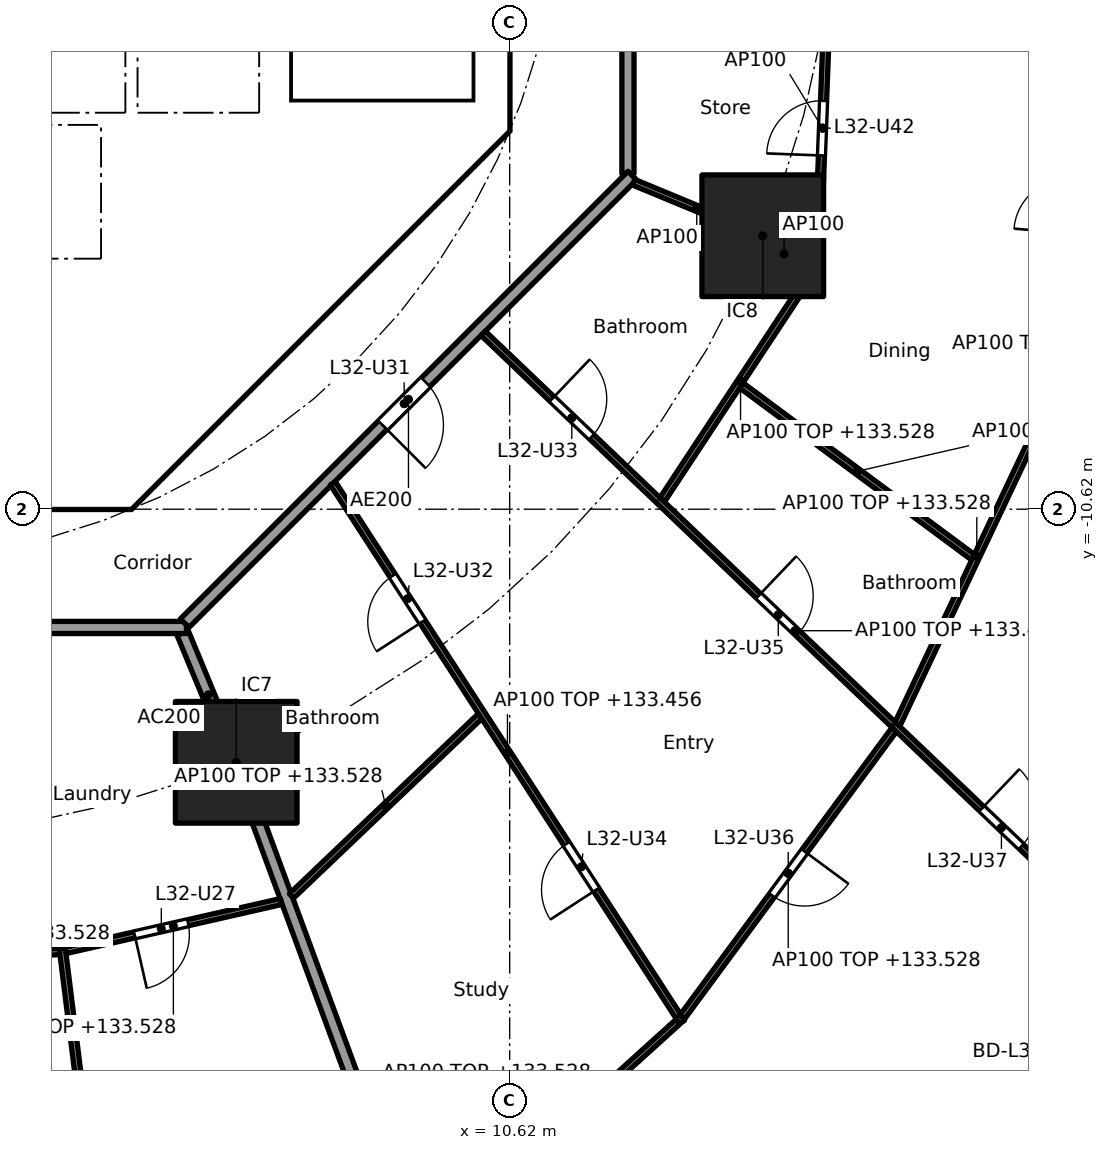
"""IFC4 building model, lengths in metres.
Left out: names, types, materials, properties, quantities, classifications, styles, units other than length and angle.
Written with IfcOpenShell. Run it as: python <this file> out.ifc"""

import sys

from ifc_helpers import new_model, si_unit, direction, frame, frame_2d, origin, origin_2d, place, context, subcontext, project, spatial, polyline, rectangle, outline, extrude, element, fill, save


model = new_model("IFC4")
c1 = context("Model", 3, precision=1e-05, world=origin(), true_north=direction((0.0, 1.0)))
c2 = subcontext(c1, "Body", "Model", "MODEL_VIEW")
j1 = project(units=[si_unit("LENGTHUNIT", "METRE"), si_unit("PLANEANGLEUNIT", "RADIAN")], contexts=[c1])
p1 = place(None, origin())
s1 = spatial("IfcSite", under=j1, at=p1, CompositionType="ELEMENT")
p2 = place(p1, origin())
s2 = spatial("IfcBuilding", under=s1, at=p2, CompositionType="ELEMENT")
p3 = place(p2, frame((0.0, 0.0, 130.7)))
s3 = spatial("IfcBuildingStorey", under=s2, at=p3, CompositionType="ELEMENT", Elevation=130.7)
for number, where, z_axis, x_axis in (
    (1, (6.123, -14.782, 0.0), (0.0, 0.0, 1.0), (1.0, 0.0, 0.0)),
    (2, (14.782, -6.123, 0.0), (0.0, 0.0, 1.0), (1.0, 0.0, 0.0)),
):
    element("IfcColumn", number, at=place(p3, frame(where, z_axis=z_axis, x_axis=x_axis)), inside=s3, PredefinedType="COLUMN", context=c2, shape_type="SweptSolid", body=[
        extrude(rectangle(XDim=2.0, YDim=2.0, at=origin_2d()), origin(), (0.0, 0.0, 1.0), 3.7),
    ])
p4 = place(p3, frame((20.768, -18.669, 0.0), z_axis=(0.0, 0.0, 1.0), x_axis=(-0.506314982873, -0.862348617508, 0.0)))
e3 = element("IfcWall", 3, at=p4, inside=s3, PredefinedType="SOLIDWALL", context=c2, shape_type="SweptSolid", body=[
    extrude(rectangle(XDim=3.208, YDim=0.25, at=frame_2d((1.604, 0.0))), origin(), (0.0, 0.0, 1.0), 3.44),
])
p5 = place(p4, frame((0.554, 0.0, 0.0)))
e4 = element("IfcOpeningElement", 4, at=p5, cuts=e3, PredefinedType="OPENING", context=c2, shape_type="SweptSolid", body=[
    extrude(rectangle(XDim=2.1, YDim=2.4, at=frame_2d((1.05, 1.2))), frame((0.0, 0.135, 0.0), z_axis=(0.0, -1.0, 0.0), x_axis=(1.0, 0.0, 0.0)), (0.0, 0.0, 1.0), 0.27),
])
p6 = place(p3, frame((4.613, -9.988, 0.0), z_axis=(0.0, 0.0, 1.0), x_axis=(0.707106781187, 0.707106781187, 0.0)))
e5 = element("IfcWall", 5, at=p6, inside=s3, PredefinedType="SHEAR", context=c2, shape_type="SweptSolid", body=[
    extrude(rectangle(XDim=7.602, YDim=0.6, at=frame_2d((3.801, 0.0))), origin(), (0.0, 0.0, 1.0), 3.44),
])
p7 = place(p6, frame((3.201, 0.0, 0.0)))
e6 = element("IfcOpeningElement", 6, at=p7, cuts=e5, PredefinedType="OPENING", context=c2, shape_type="SweptSolid", body=[
    extrude(rectangle(XDim=1.2, YDim=2.1, at=frame_2d((0.6, 1.05))), frame((0.0, 0.31, 0.0), z_axis=(0.0, -1.0, 0.0), x_axis=(1.0, 0.0, 0.0)), (0.0, 0.0, 1.0), 0.62),
])
p8 = place(p3, frame((4.0, -10.025, 0.0), z_axis=(0.0, 0.0, 1.0), x_axis=(0.0, 1.0, 0.0)))
e7 = element("IfcWall", 7, at=p8, inside=s3, PredefinedType="SOLIDWALL", context=c2, shape_type="SweptSolid", body=[
    extrude(rectangle(XDim=3.0, YDim=0.2, at=frame_2d((1.5, 0.0))), origin(), (0.0, 0.0, 1.0), 3.44),
])
p9 = place(p8, frame((0.975, 0.0, 0.0)))
e8 = element("IfcOpeningElement", 8, at=p9, cuts=e7, PredefinedType="OPENING", context=c2, shape_type="SweptSolid", body=[
    extrude(rectangle(XDim=1.1, YDim=2.1, at=frame_2d((0.55, 1.05))), frame((0.0, 0.11, 0.0), z_axis=(0.0, -1.0, 0.0), x_axis=(1.0, 0.0, 0.0)), (0.0, 0.0, 1.0), 0.22),
])
p10 = place(p3, frame((4.0, -6.5, 0.0), z_axis=(0.0, 0.0, 1.0), x_axis=(0.0, 1.0, 0.0)))
e9 = element("IfcWall", 9, at=p10, inside=s3, PredefinedType="SOLIDWALL", context=c2, shape_type="SweptSolid", body=[
    extrude(rectangle(XDim=2.2, YDim=0.2, at=frame_2d((1.1, 0.0))), origin(), (0.0, 0.0, 1.0), 3.44),
])
p11 = place(p10, frame((0.55, 0.0, 0.0)))
e10 = element("IfcOpeningElement", 10, at=p11, cuts=e9, PredefinedType="OPENING", context=c2, shape_type="SweptSolid", body=[
    extrude(rectangle(XDim=1.1, YDim=2.1, at=frame_2d((0.55, 1.05))), frame((0.0, 0.11, 0.0), z_axis=(0.0, -1.0, 0.0), x_axis=(1.0, 0.0, 0.0)), (0.0, 0.0, 1.0), 0.22),
])
p12 = place(p3, origin())
e11 = element("IfcWall", 11, at=p12, inside=s3, PredefinedType="SHEAR", context=c2, shape_type="SweptSolid", body=[
    extrude(outline(polyline([(-4.152, -10.025), (4.152, -10.025), (4.401, -9.776), (4.825, -10.2), (4.401, -10.625), (-4.401, -10.625), (-4.825, -10.2), (-4.401, -9.776), (-4.152, -10.025)])), origin(), (0.0, 0.0, 1.0), 3.44),
])
p13 = place(p3, origin())
e12 = element("IfcWall", 12, at=p13, inside=s3, PredefinedType="SHEAR", context=c2, shape_type="SweptSolid", body=[
    extrude(outline(polyline([(9.776, -4.401), (10.025, -4.152), (10.025, -3.801), (10.025, 4.152), (9.776, 4.401), (10.2, 4.825), (10.625, 4.401), (10.625, -4.401), (10.2, -4.825), (9.776, -4.401)])), origin(), (0.0, 0.0, 1.0), 3.44),
])
p14 = place(p3, origin())
e13 = element("IfcWall", 13, at=p14, inside=s3, PredefinedType="SOLIDWALL", context=c2, shape_type="SweptSolid", body=[
    extrude(outline(polyline([(-6.7, -2.1), (-6.5, -2.1), (-6.5, -4.1), (-4.5, -4.1), (-4.5, -2.1), (-4.3, -2.1), (-4.3, -4.1), (-2.3, -4.1), (-2.3, -2.1), (-2.1, -2.1), (-2.1, -4.1), (-0.1, -4.1), (-0.1, -2.1), (0.1, -2.1), (0.1, -4.1), (2.1, -4.1), (2.1, -2.1), (2.3, -2.1), (2.3, -4.1), (4.3, -4.1), (4.3, -2.1), (4.5, -2.1), (4.5, -4.1), (6.5, -4.1), (6.5, -2.1), (6.7, -2.1), (6.7, -4.3), (-6.7, -4.3), (-6.7, -2.1)])), origin(), (0.0, 0.0, 1.0), 3.44),
])
p15 = place(p3, origin())
e14 = element("IfcWall", 14, at=p15, inside=s3, PredefinedType="SOLIDWALL", context=c2, shape_type="SweptSolid", body=[
    extrude(outline(polyline([(4.1, -7.025), (-4.1, -7.025), (-4.1, -6.5), (4.1, -6.5), (4.1, -7.025)])), origin(), (0.0, 0.0, 1.0), 3.44),
])
p16 = place(p3, origin())
e15 = element("IfcWall", 15, at=p16, inside=s3, PredefinedType="SOLIDWALL", context=c2, shape_type="SweptSolid", body=[
    extrude(outline(polyline([(7.025, -3.9), (6.7, -3.9), (6.7, 3.9), (7.025, 3.9), (7.025, -3.9)])), origin(), (0.0, 0.0, 1.0), 3.44),
])
p17 = place(p3, origin())
e16 = element("IfcWall", 16, at=p17, inside=s3, PredefinedType="SOLIDWALL", context=c2, shape_type="SweptSolid", body=[
    extrude(outline(polyline([(10.025, -4.1), (6.7, -4.1), (6.7, -3.9), (10.025, -3.9), (10.025, -4.1)])), origin(), (0.0, 0.0, 1.0), 3.44),
])
p18 = place(p3, frame((5.243, -12.657, 0.0), z_axis=(0.0, 0.0, 1.0), x_axis=(0.38273085373, -0.923859888513, 0.0)))
e17 = element("IfcWall", 17, at=p18, inside=s3, PredefinedType="PARTITIONING", context=c2, shape_type="SweptSolid", body=[
    extrude(rectangle(XDim=2.199, YDim=0.2, at=frame_2d((1.1, 0.0))), origin(), (0.0, 0.0, 1.0), 3.44),
])
p19 = place(p3, frame((6.14, -14.829, 0.0), z_axis=(0.0, 0.0, 1.0), x_axis=(0.346169582481, -0.938171956608, 0.0)))
e18 = element("IfcWall", 18, at=p19, inside=s3, PredefinedType="PARTITIONING", context=c2, shape_type="SweptSolid", body=[
    extrude(rectangle(XDim=14.354, YDim=0.2, at=frame_2d((7.177, 0.0))), origin(), (0.0, 0.0, 1.0), 2.828),
])
p20 = place(p3, frame((12.565, -5.104, 0.0), z_axis=(0.0, 0.0, 1.0), x_axis=(0.0, 1.0, 0.0)))
e19 = element("IfcWall", 19, at=p20, inside=s3, PredefinedType="PARTITIONING", context=c2, shape_type="SweptSolid", body=[
    extrude(rectangle(XDim=10.209, YDim=0.2, at=frame_2d((5.104, 0.0))), origin(), (0.0, 0.0, 1.0), 3.44),
])
p21 = place(p3, frame((-5.104, -12.565, 0.0), z_axis=(0.0, 0.0, 1.0), x_axis=(1.0, 0.0, 0.0)))
e20 = element("IfcWall", 20, at=p21, inside=s3, PredefinedType="PARTITIONING", context=c2, shape_type="SweptSolid", body=[
    extrude(rectangle(XDim=10.409, YDim=0.2, at=frame_2d((5.205, 0.0))), origin(), (0.0, 0.0, 1.0), 3.44),
])
p22 = place(p21, frame((4.604, 0.0, 0.0)))
e21 = element("IfcOpeningElement", 21, at=p22, cuts=e20, PredefinedType="OPENING", context=c2, shape_type="SweptSolid", body=[
    extrude(rectangle(XDim=1.0, YDim=2.1, at=frame_2d((0.5, 1.05))), frame((0.0, 0.11, 0.0), z_axis=(0.0, -1.0, 0.0), x_axis=(1.0, 0.0, 0.0)), (0.0, 0.0, 1.0), 0.22),
])
p23 = place(p3, frame((5.275, -12.494, 0.0), z_axis=(0.0, 0.0, 1.0), x_axis=(0.707106781187, 0.707106781187, 0.0)))
e22 = element("IfcWall", 22, at=p23, inside=s3, PredefinedType="PARTITIONING", context=c2, shape_type="SweptSolid", body=[
    extrude(rectangle(XDim=10.409, YDim=0.2, at=frame_2d((5.205, 0.0))), origin(), (0.0, 0.0, 1.0), 3.44),
])
p24 = place(p23, frame((4.604, 0.0, 0.0)))
e23 = element("IfcOpeningElement", 23, at=p24, cuts=e22, PredefinedType="OPENING", context=c2, shape_type="SweptSolid", body=[
    extrude(rectangle(XDim=1.0, YDim=2.1, at=frame_2d((0.5, 1.05))), frame((0.0, 0.11, 0.0), z_axis=(0.0, -1.0, 0.0), x_axis=(1.0, 0.0, 0.0)), (0.0, 0.0, 1.0), 0.22),
])
p25 = place(p3, frame((15.849, -2.158, 0.0), z_axis=(0.0, 0.0, 1.0), x_axis=(-0.038390448414, -0.999262815014, 0.0)))
e24 = element("IfcWall", 24, at=p25, inside=s3, PredefinedType="PARTITIONING", context=c2, shape_type="SweptSolid", body=[
    extrude(rectangle(XDim=4.394, YDim=0.1, at=frame_2d((2.197, 0.0))), origin(), (0.0, 0.0, 1.0), 3.44),
])
p26 = place(p25, frame((1.747, 0.0, 0.0)))
e25 = element("IfcOpeningElement", 25, at=p26, cuts=e24, PredefinedType="OPENING", context=c2, shape_type="SweptSolid", body=[
    extrude(rectangle(XDim=0.9, YDim=2.1, at=frame_2d((0.45, 1.05))), frame((0.0, 0.06, 0.0), z_axis=(0.0, -1.0, 0.0), x_axis=(1.0, 0.0, 0.0)), (0.0, 0.0, 1.0), 0.12),
])
p27 = place(p3, frame((1.441, -18.024, 0.0), z_axis=(0.0, 0.0, 1.0), x_axis=(0.997269623256, 0.073846452388, 0.0)))
e26 = element("IfcWall", 26, at=p27, inside=s3, PredefinedType="PARTITIONING", context=c2, shape_type="SweptSolid", body=[
    extrude(rectangle(XDim=1.782, YDim=0.1, at=frame_2d((0.891, 0.0))), origin(), (0.0, 0.0, 1.0), 2.828),
])
p28 = place(p3, frame((3.262, -17.839, 0.0), z_axis=(0.0, 0.0, 1.0), x_axis=(0.124074750982, -0.992272873845, 0.0)))
e27 = element("IfcWall", 27, at=p28, inside=s3, PredefinedType="PARTITIONING", context=c2, shape_type="SweptSolid", body=[
    extrude(rectangle(XDim=13.516, YDim=0.1, at=frame_2d((6.758, 0.0))), origin(), (0.0, 0.0, 1.0), 2.828),
])
p29 = place(p28, frame((9.811, 0.0, 0.0)))
e28 = element("IfcOpeningElement", 28, at=p29, cuts=e27, PredefinedType="OPENING", context=c2, shape_type="SweptSolid", body=[
    extrude(rectangle(XDim=0.9, YDim=2.1, at=frame_2d((0.45, 1.05))), frame((0.0, 0.06, 0.0), z_axis=(0.0, -1.0, 0.0), x_axis=(1.0, 0.0, 0.0)), (0.0, 0.0, 1.0), 0.12),
])
p30 = place(p3, frame((3.317, -17.878, 0.0), z_axis=(0.0, 0.0, 1.0), x_axis=(0.975095905288, 0.221783623135, 0.0)))
e29 = element("IfcWall", 29, at=p30, inside=s3, PredefinedType="PARTITIONING", context=c2, shape_type="SweptSolid", body=[
    extrude(rectangle(XDim=3.636, YDim=0.1, at=frame_2d((1.818, 0.0))), origin(), (0.0, 0.0, 1.0), 2.828),
])
p31 = place(p30, frame((1.164, 0.0, 0.0)))
e30 = element("IfcOpeningElement", 30, at=p31, cuts=e29, PredefinedType="OPENING", context=c2, shape_type="SweptSolid", body=[
    extrude(rectangle(XDim=0.9, YDim=2.1, at=frame_2d((0.45, 1.05))), frame((0.0, 0.06, 0.0), z_axis=(0.0, -1.0, 0.0), x_axis=(1.0, 0.0, 0.0)), (0.0, 0.0, 1.0), 0.12),
])
p32 = place(p3, frame((7.032, -16.98, 0.0), z_axis=(0.0, 0.0, 1.0), x_axis=(0.723709759148, 0.690104473622, 0.0)))
e31 = element("IfcWall", 31, at=p32, inside=s3, PredefinedType="PARTITIONING", context=c2, shape_type="SweptSolid", body=[
    extrude(rectangle(XDim=4.286, YDim=0.1, at=frame_2d((2.143, 0.0))), origin(), (0.0, 0.0, 1.0), 2.828),
])
p33 = place(p3, frame((9.195, -22.84, 0.0), z_axis=(0.0, 0.0, 1.0), x_axis=(0.741675855479, 0.670758470241, 0.0)))
e32 = element("IfcWall", 32, at=p33, inside=s3, PredefinedType="PARTITIONING", context=c2, shape_type="SweptSolid", body=[
    extrude(rectangle(XDim=5.656, YDim=0.1, at=frame_2d((2.828, 0.0))), origin(), (0.0, 0.0, 1.0), 2.828),
])
p34 = place(p3, frame((7.712, -10.195, 0.0), z_axis=(0.0, 0.0, 1.0), x_axis=(0.543868615753, -0.839170381269, 0.0)))
e33 = element("IfcWall", 33, at=p34, inside=s3, PredefinedType="PARTITIONING", context=c2, shape_type="SweptSolid", body=[
    extrude(rectangle(XDim=10.558, YDim=0.1, at=frame_2d((5.279, 0.0))), origin(), (0.0, 0.0, 1.0), 2.756),
])
p35 = place(p34, frame((1.81, 0.0, 0.0)))
e34 = element("IfcOpeningElement", 34, at=p35, cuts=e33, PredefinedType="OPENING", context=c2, shape_type="SweptSolid", body=[
    extrude(rectangle(XDim=0.9, YDim=2.1, at=frame_2d((0.45, 1.05))), frame((0.0, 0.06, 0.0), z_axis=(0.0, -1.0, 0.0), x_axis=(1.0, 0.0, 0.0)), (0.0, 0.0, 1.0), 0.12),
])
p36 = place(p34, frame((7.064, 0.0, 0.0)))
e35 = element("IfcOpeningElement", 35, at=p36, cuts=e33, PredefinedType="OPENING", context=c2, shape_type="SweptSolid", body=[
    extrude(rectangle(XDim=0.9, YDim=2.1, at=frame_2d((0.45, 1.05))), frame((0.0, 0.06, 0.0), z_axis=(0.0, -1.0, 0.0), x_axis=(1.0, 0.0, 0.0)), (0.0, 0.0, 1.0), 0.12),
])
p37 = place(p3, frame((13.457, -18.973, 0.0), z_axis=(0.0, 0.0, 1.0), x_axis=(0.593532053206, 0.80481035146, 0.0)))
e36 = element("IfcWall", 36, at=p37, inside=s3, PredefinedType="PARTITIONING", context=c2, shape_type="SweptSolid", body=[
    extrude(rectangle(XDim=5.876, YDim=0.1, at=frame_2d((2.938, 0.0))), origin(), (0.0, 0.0, 1.0), 2.828),
])
p38 = place(p37, frame((2.488, 0.0, 0.0)))
e37 = element("IfcOpeningElement", 37, at=p38, cuts=e36, PredefinedType="OPENING", context=c2, shape_type="SweptSolid", body=[
    extrude(rectangle(XDim=0.9, YDim=2.1, at=frame_2d((0.45, 1.05))), frame((0.0, 0.06, 0.0), z_axis=(0.0, -1.0, 0.0), x_axis=(1.0, 0.0, 0.0)), (0.0, 0.0, 1.0), 0.12),
])
p39 = place(p3, frame((10.184, -7.727, 0.0), z_axis=(0.0, 0.0, 1.0), x_axis=(0.723635100101, -0.690182759783, 0.0)))
e38 = element("IfcWall", 38, at=p39, inside=s3, PredefinedType="PARTITIONING", context=c2, shape_type="SweptSolid", body=[
    extrude(rectangle(XDim=14.173, YDim=0.1, at=frame_2d((7.086, 0.0))), origin(), (0.0, 0.0, 1.0), 2.756),
])
p40 = place(p39, frame((1.565, 0.0, 0.0)))
e39 = element("IfcOpeningElement", 39, at=p40, cuts=e38, PredefinedType="OPENING", context=c2, shape_type="SweptSolid", body=[
    extrude(rectangle(XDim=0.9, YDim=2.1, at=frame_2d((0.45, 1.05))), frame((0.0, 0.06, 0.0), z_axis=(0.0, -1.0, 0.0), x_axis=(1.0, 0.0, 0.0)), (0.0, 0.0, 1.0), 0.12),
])
p41 = place(p39, frame((6.257, 0.0, 0.0)))
e40 = element("IfcOpeningElement", 40, at=p41, cuts=e38, PredefinedType="OPENING", context=c2, shape_type="SweptSolid", body=[
    extrude(rectangle(XDim=0.9, YDim=2.1, at=frame_2d((0.45, 1.05))), frame((0.0, 0.06, 0.0), z_axis=(0.0, -1.0, 0.0), x_axis=(1.0, 0.0, 0.0)), (0.0, 0.0, 1.0), 0.12),
])
p42 = place(p39, frame((11.328, 0.0, 0.0)))
e41 = element("IfcOpeningElement", 41, at=p42, cuts=e38, PredefinedType="OPENING", context=c2, shape_type="SweptSolid", body=[
    extrude(rectangle(XDim=0.9, YDim=2.1, at=frame_2d((0.45, 1.05))), frame((0.0, 0.06, 0.0), z_axis=(0.0, -1.0, 0.0), x_axis=(1.0, 0.0, 0.0)), (0.0, 0.0, 1.0), 0.12),
])
p43 = place(p3, frame((13.127, -10.467, 0.0), z_axis=(0.0, 0.0, 1.0), x_axis=(0.550614843759, 0.834759422727, 0.0)))
e42 = element("IfcWall", 42, at=p43, inside=s3, PredefinedType="PARTITIONING", context=c2, shape_type="SweptSolid", body=[
    extrude(rectangle(XDim=4.683, YDim=0.1, at=frame_2d((2.341, 0.0))), origin(), (0.0, 0.0, 1.0), 2.828),
])
p44 = place(p3, frame((16.995, -14.158, 0.0), z_axis=(0.0, 0.0, 1.0), x_axis=(0.427456178439, 0.904036069808, 0.0)))
e43 = element("IfcWall", 43, at=p44, inside=s3, PredefinedType="PARTITIONING", context=c2, shape_type="SweptSolid", body=[
    extrude(rectangle(XDim=6.113, YDim=0.1, at=frame_2d((3.057, 0.0))), origin(), (0.0, 0.0, 1.0), 2.828),
])
p45 = place(p3, frame((14.429, -8.583, 0.0), z_axis=(0.0, 0.0, 1.0), x_axis=(0.803162355549, -0.595760212358, 0.0)))
e44 = element("IfcWall", 44, at=p45, inside=s3, PredefinedType="PARTITIONING", context=c2, shape_type="SweptSolid", body=[
    extrude(rectangle(XDim=4.745, YDim=0.1, at=frame_2d((2.373, 0.0))), origin(), (0.0, 0.0, 1.0), 3.44),
])
p46 = place(p3, frame((12.657, -5.243, 0.0), z_axis=(0.0, 0.0, 1.0), x_axis=(0.923864733477, -0.382719158442, 0.0)))
e45 = element("IfcWall", 45, at=p46, inside=s3, PredefinedType="PARTITIONING", context=c2, shape_type="SweptSolid", body=[
    extrude(rectangle(XDim=2.25, YDim=0.1, at=frame_2d((1.125, 0.0))), origin(), (0.0, 0.0, 1.0), 3.44),
])
p47 = place(p3, frame((14.774, -6.232, 0.0), z_axis=(0.0, 0.0, 1.0), x_axis=(0.883135211276, -0.46911853364, 0.0)))
e46 = element("IfcWall", 46, at=p47, inside=s3, PredefinedType="PARTITIONING", context=c2, shape_type="SweptSolid", body=[
    extrude(rectangle(XDim=0.811, YDim=0.1, at=frame_2d((0.405, 0.0))), origin(), (0.0, 0.0, 1.0), 3.44),
])
p48 = place(p11, origin())
e47 = element("IfcDoor", 47, at=p48, inside=s3, OperationType="DOUBLE_DOOR_SLIDING", PredefinedType="DOOR", context=c2, shape_type="SweptSolid", body=[
    extrude(rectangle(XDim=1.1, YDim=2.1, at=frame_2d((0.55, 1.05))), frame((0.0, 0.025, 0.0), z_axis=(0.0, -1.0, 0.0), x_axis=(1.0, 0.0, 0.0)), (0.0, 0.0, 1.0), 0.05),
])
fill(e10, e47)
p49 = place(p9, origin())
e48 = element("IfcDoor", 48, at=p49, inside=s3, OperationType="SINGLE_SWING_RIGHT", PredefinedType="DOOR", context=c2, shape_type="SweptSolid", body=[
    extrude(rectangle(XDim=1.1, YDim=2.1, at=frame_2d((0.55, 1.05))), frame((0.0, 0.025, 0.0), z_axis=(0.0, -1.0, 0.0), x_axis=(1.0, 0.0, 0.0)), (0.0, 0.0, 1.0), 0.05),
])
fill(e8, e48)
p50 = place(p7, origin())
e49 = element("IfcDoor", 49, at=p50, inside=s3, OperationType="SINGLE_SWING_LEFT", PredefinedType="DOOR", context=c2, shape_type="SweptSolid", body=[
    extrude(rectangle(XDim=1.2, YDim=2.1, at=frame_2d((0.6, 1.05))), frame((0.0, 0.025, 0.0), z_axis=(0.0, -1.0, 0.0), x_axis=(1.0, 0.0, 0.0)), (0.0, 0.0, 1.0), 0.05),
])
fill(e6, e49)
p51 = place(p31, frame((0.9, 0.0, 0.0), x_axis=(-1.0, 0.0, 0.0)))
e50 = element("IfcDoor", 50, at=p51, inside=s3, OperationType="SINGLE_SWING_RIGHT", PredefinedType="DOOR", context=c2, shape_type="SweptSolid", body=[
    extrude(rectangle(XDim=0.9, YDim=2.1, at=frame_2d((0.45, 1.05))), frame((0.0, 0.025, 0.0), z_axis=(0.0, -1.0, 0.0), x_axis=(1.0, 0.0, 0.0)), (0.0, 0.0, 1.0), 0.05),
])
fill(e30, e50)
p52 = place(p24, frame((1.0, 0.0, 0.0), x_axis=(-1.0, 0.0, 0.0)))
e51 = element("IfcDoor", 51, at=p52, inside=s3, OperationType="SINGLE_SWING_RIGHT", PredefinedType="DOOR", context=c2, shape_type="SweptSolid", body=[
    extrude(rectangle(XDim=1.0, YDim=2.1, at=frame_2d((0.5, 1.05))), frame((0.0, 0.025, 0.0), z_axis=(0.0, -1.0, 0.0), x_axis=(1.0, 0.0, 0.0)), (0.0, 0.0, 1.0), 0.05),
])
fill(e23, e51)
p53 = place(p35, frame((0.9, 0.0, 0.0), x_axis=(-1.0, 0.0, 0.0)))
e52 = element("IfcDoor", 52, at=p53, inside=s3, OperationType="SINGLE_SWING_LEFT", PredefinedType="DOOR", context=c2, shape_type="SweptSolid", body=[
    extrude(rectangle(XDim=0.9, YDim=2.1, at=frame_2d((0.45, 1.05))), frame((0.0, 0.025, 0.0), z_axis=(0.0, -1.0, 0.0), x_axis=(1.0, 0.0, 0.0)), (0.0, 0.0, 1.0), 0.05),
])
fill(e34, e52)
p54 = place(p40, origin())
e53 = element("IfcDoor", 53, at=p54, inside=s3, OperationType="SINGLE_SWING_LEFT", PredefinedType="DOOR", context=c2, shape_type="SweptSolid", body=[
    extrude(rectangle(XDim=0.9, YDim=2.1, at=frame_2d((0.45, 1.05))), frame((0.0, 0.025, 0.0), z_axis=(0.0, -1.0, 0.0), x_axis=(1.0, 0.0, 0.0)), (0.0, 0.0, 1.0), 0.05),
])
fill(e39, e53)
p55 = place(p36, frame((0.9, 0.0, 0.0), x_axis=(-1.0, 0.0, 0.0)))
e54 = element("IfcDoor", 54, at=p55, inside=s3, OperationType="SINGLE_SWING_LEFT", PredefinedType="DOOR", context=c2, shape_type="SweptSolid", body=[
    extrude(rectangle(XDim=0.9, YDim=2.1, at=frame_2d((0.45, 1.05))), frame((0.0, 0.025, 0.0), z_axis=(0.0, -1.0, 0.0), x_axis=(1.0, 0.0, 0.0)), (0.0, 0.0, 1.0), 0.05),
])
fill(e35, e54)
p56 = place(p41, origin())
e55 = element("IfcDoor", 55, at=p56, inside=s3, OperationType="SINGLE_SWING_LEFT", PredefinedType="DOOR", context=c2, shape_type="SweptSolid", body=[
    extrude(rectangle(XDim=0.9, YDim=2.1, at=frame_2d((0.45, 1.05))), frame((0.0, 0.025, 0.0), z_axis=(0.0, -1.0, 0.0), x_axis=(1.0, 0.0, 0.0)), (0.0, 0.0, 1.0), 0.05),
])
fill(e40, e55)
p57 = place(p38, frame((0.9, 0.0, 0.0), x_axis=(-1.0, 0.0, 0.0)))
e56 = element("IfcDoor", 56, at=p57, inside=s3, OperationType="SINGLE_SWING_LEFT", PredefinedType="DOOR", context=c2, shape_type="SweptSolid", body=[
    extrude(rectangle(XDim=0.9, YDim=2.1, at=frame_2d((0.45, 1.05))), frame((0.0, 0.025, 0.0), z_axis=(0.0, -1.0, 0.0), x_axis=(1.0, 0.0, 0.0)), (0.0, 0.0, 1.0), 0.05),
])
fill(e37, e56)
p58 = place(p42, origin())
e57 = element("IfcDoor", 57, at=p58, inside=s3, OperationType="SINGLE_SWING_LEFT", PredefinedType="DOOR", context=c2, shape_type="SweptSolid", body=[
    extrude(rectangle(XDim=0.9, YDim=2.1, at=frame_2d((0.45, 1.05))), frame((0.0, 0.025, 0.0), z_axis=(0.0, -1.0, 0.0), x_axis=(1.0, 0.0, 0.0)), (0.0, 0.0, 1.0), 0.05),
])
fill(e41, e57)
p59 = place(p26, frame((0.9, 0.0, 0.0), x_axis=(-1.0, 0.0, 0.0)))
e58 = element("IfcDoor", 58, at=p59, inside=s3, OperationType="SINGLE_SWING_LEFT", PredefinedType="DOOR", context=c2, shape_type="SweptSolid", body=[
    extrude(rectangle(XDim=0.9, YDim=2.1, at=frame_2d((0.45, 1.05))), frame((0.0, 0.025, 0.0), z_axis=(0.0, -1.0, 0.0), x_axis=(1.0, 0.0, 0.0)), (0.0, 0.0, 1.0), 0.05),
])
fill(e25, e58)
save(model, sys.argv[1])
